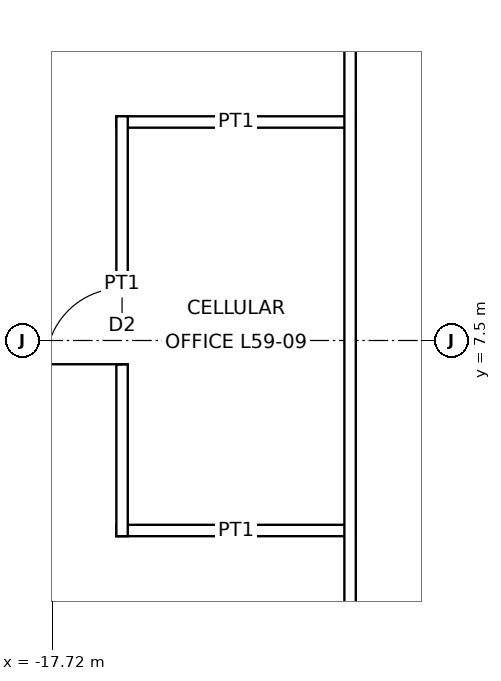
"""IFC4 building model, lengths in metres.
Left out: names, types, materials, properties, quantities, classifications, styles, units other than length and angle.
Written with IfcOpenShell. Run it as: python <this file> out.ifc"""

import sys

from ifc_helpers import new_model, si_unit, direction, frame, frame_2d, origin, place, context, subcontext, project, spatial, rectangle, extrude, element, fill, save


model = new_model("IFC4")
c1 = context("Model", 3, precision=1e-05, world=origin(), true_north=direction((0.0, 1.0)))
c2 = subcontext(c1, "Body", "Model", "MODEL_VIEW")
j1 = project(units=[si_unit("LENGTHUNIT", "METRE"), si_unit("PLANEANGLEUNIT", "RADIAN")], contexts=[c1])
p1 = place(None, origin())
s1 = spatial("IfcSite", under=j1, at=p1, CompositionType="ELEMENT")
p2 = place(p1, origin())
s2 = spatial("IfcBuilding", under=s1, at=p2, CompositionType="ELEMENT")
p3 = place(p2, frame((0.0, 0.0, 271.9)))
s3 = spatial("IfcBuildingStorey", under=s2, at=p3, CompositionType="ELEMENT", Elevation=271.9)
for number, where, z_axis, x_axis in (
    (1, (-16.875, 5.0, 0.0), (0.0, 0.0, 1.0), (1.0, 0.0, 0.0)),
    (2, (-16.875, 10.375, 0.0), (0.0, 0.0, 1.0), (1.0, 0.0, 0.0)),
):
    element("IfcWall", number, at=place(p3, frame(where, z_axis=z_axis, x_axis=x_axis)), inside=s3, PredefinedType="PARTITIONING", context=c2, shape_type="SweptSolid", body=[
        extrude(rectangle(XDim=3.15, YDim=0.15, at=frame_2d((1.575, 0.0))), origin(), (0.0, 0.0, 1.0), 3.85),
    ])
p4 = place(p3, frame((-16.8, 4.925, 0.0), z_axis=(0.0, 0.0, 1.0), x_axis=(0.0, 1.0, 0.0)))
e3 = element("IfcWall", 3, at=p4, inside=s3, PredefinedType="PARTITIONING", context=c2, shape_type="SweptSolid", body=[
    extrude(rectangle(XDim=5.525, YDim=0.15, at=frame_2d((2.762, 0.0))), origin(), (0.0, 0.0, 1.0), 3.85),
])
p5 = place(p4, frame((2.262, 0.0, 0.0)))
e4 = element("IfcOpeningElement", 4, at=p5, cuts=e3, PredefinedType="OPENING", context=c2, shape_type="SweptSolid", body=[
    extrude(rectangle(XDim=1.0, YDim=2.1, at=frame_2d((0.5, 1.05))), frame((0.0, 0.085, 0.0), z_axis=(0.0, -1.0, 0.0), x_axis=(1.0, 0.0, 0.0)), (0.0, 0.0, 1.0), 0.17),
])
p6 = place(p3, frame((-13.8, -13.875, 0.0), z_axis=(0.0, 0.0, 1.0), x_axis=(0.0, 1.0, 0.0)))
e5 = element("IfcWall", 5, at=p6, inside=s3, PredefinedType="PARTITIONING", context=c2, shape_type="SweptSolid", body=[
    extrude(rectangle(XDim=27.75, YDim=0.15, at=frame_2d((13.875, 0.0))), origin(), (0.0, 0.0, 1.0), 3.85),
])
p7 = place(p5, origin())
e6 = element("IfcDoor", 6, at=p7, inside=s3, OperationType="SINGLE_SWING_LEFT", PredefinedType="DOOR", context=c2, shape_type="SweptSolid", body=[
    extrude(rectangle(XDim=1.0, YDim=2.1, at=frame_2d((0.5, 1.05))), frame((0.0, 0.025, 0.0), z_axis=(0.0, -1.0, 0.0), x_axis=(1.0, 0.0, 0.0)), (0.0, 0.0, 1.0), 0.05),
])
fill(e4, e6)
save(model, sys.argv[1])
